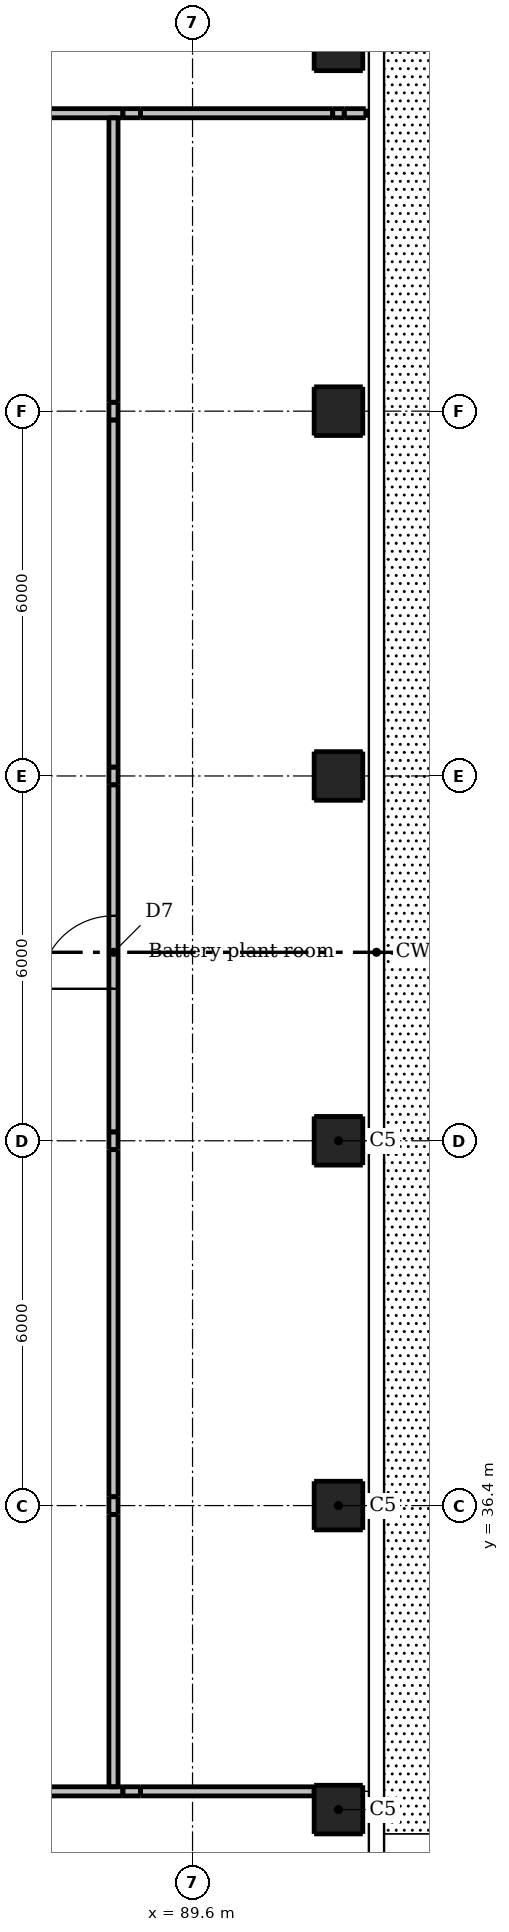
"""IFC4 building model, lengths in metres.
Left out: names, types, materials, properties, quantities, classifications, styles, units other than length and angle.
Written with IfcOpenShell. Run it as: python <this file> out.ifc"""

import sys

from ifc_helpers import new_model, si_unit, direction, frame, frame_2d, origin, origin_2d, place, context, subcontext, project, spatial, rectangle, extrude, element, fill, save


model = new_model("IFC4")
c1 = context("Model", 3, precision=1e-05, world=origin(), true_north=direction((0.0, 1.0)))
c2 = subcontext(c1, "Body", "Model", "MODEL_VIEW")
j1 = project(units=[si_unit("LENGTHUNIT", "METRE"), si_unit("PLANEANGLEUNIT", "RADIAN")], contexts=[c1])
p1 = place(None, origin())
s1 = spatial("IfcSite", under=j1, at=p1, CompositionType="ELEMENT")
p2 = place(p1, origin())
s2 = spatial("IfcBuilding", under=s1, at=p2, CompositionType="ELEMENT")
p3 = place(p2, frame((0.0, 0.0, 290.8)))
s3 = spatial("IfcBuildingStorey", under=s2, at=p3, CompositionType="ELEMENT", Elevation=290.8)
for number, where, z_axis, x_axis in (
    (1, (92.0, 31.4, 0.0), (0.0, 0.0, 1.0), (1.0, 0.0, 0.0)),
    (2, (92.0, 36.4, 0.0), (0.0, 0.0, 1.0), (1.0, 0.0, 0.0)),
    (3, (92.0, 42.4, 0.0), (0.0, 0.0, 1.0), (1.0, 0.0, 0.0)),
    (4, (92.0, 48.4, 0.0), (0.0, 0.0, 1.0), (1.0, 0.0, 0.0)),
    (5, (92.0, 54.4, 0.0), (0.0, 0.0, 1.0), (1.0, 0.0, 0.0)),
    (6, (92.0, 60.4, 0.0), (0.0, 0.0, 1.0), (1.0, 0.0, 0.0)),
):
    element("IfcColumn", number, at=place(p3, frame(where, z_axis=z_axis, x_axis=x_axis)), inside=s3, PredefinedType="COLUMN", context=c2, shape_type="SweptSolid", body=[
        extrude(rectangle(XDim=0.8, YDim=0.8, at=origin_2d()), origin(), (0.0, 0.0, 1.0), 3.3),
    ])
p4 = place(p3, frame((83.746, 31.7, 0.0), z_axis=(0.0, 0.0, 1.0), x_axis=(1.0, 0.0, 0.0)))
e7 = element("IfcWall", 7, at=p4, inside=s3, PredefinedType="PARTITIONING", context=c2, shape_type="SweptSolid", body=[
    extrude(rectangle(XDim=4.708, YDim=0.15, at=frame_2d((2.354, 0.0))), origin(), (0.0, 0.0, 1.0), 3.3),
])
p5 = place(p3, frame((88.454, 31.7, 0.0), z_axis=(0.0, 0.0, 1.0), x_axis=(1.0, 0.0, 0.0)))
e8 = element("IfcWall", 8, at=p5, inside=s3, PredefinedType="PARTITIONING", context=c2, shape_type="SweptSolid", body=[
    extrude(rectangle(XDim=0.292, YDim=0.15, at=frame_2d((0.146, 0.0))), origin(), (0.0, 0.0, 1.0), 2.462),
])
p6 = place(p3, frame((88.746, 31.7, 0.0), z_axis=(0.0, 0.0, 1.0), x_axis=(1.0, 0.0, 0.0)))
e9 = element("IfcWall", 9, at=p6, inside=s3, PredefinedType="PARTITIONING", context=c2, shape_type="SweptSolid", body=[
    extrude(rectangle(XDim=2.854, YDim=0.15, at=frame_2d((1.427, 0.0))), origin(), (0.0, 0.0, 1.0), 3.3),
])
p7 = place(p3, frame((83.746, 59.3, 0.0), z_axis=(0.0, 0.0, 1.0), x_axis=(1.0, 0.0, 0.0)))
e10 = element("IfcWall", 10, at=p7, inside=s3, PredefinedType="PARTITIONING", context=c2, shape_type="SweptSolid", body=[
    extrude(rectangle(XDim=4.708, YDim=0.15, at=frame_2d((2.354, 0.0))), origin(), (0.0, 0.0, 1.0), 3.3),
])
p8 = place(p3, frame((88.454, 59.3, 0.0), z_axis=(0.0, 0.0, 1.0), x_axis=(1.0, 0.0, 0.0)))
e11 = element("IfcWall", 11, at=p8, inside=s3, PredefinedType="PARTITIONING", context=c2, shape_type="SweptSolid", body=[
    extrude(rectangle(XDim=0.292, YDim=0.15, at=frame_2d((0.146, 0.0))), origin(), (0.0, 0.0, 1.0), 2.462),
])
p9 = place(p3, frame((88.746, 59.3, 0.0), z_axis=(0.0, 0.0, 1.0), x_axis=(1.0, 0.0, 0.0)))
e12 = element("IfcWall", 12, at=p9, inside=s3, PredefinedType="PARTITIONING", context=c2, shape_type="SweptSolid", body=[
    extrude(rectangle(XDim=3.159, YDim=0.15, at=frame_2d((1.58, 0.0))), origin(), (0.0, 0.0, 1.0), 3.3),
])
p10 = place(p3, frame((91.905, 59.3, 0.0), z_axis=(0.0, 0.0, 1.0), x_axis=(1.0, 0.0, 0.0)))
e13 = element("IfcWall", 13, at=p10, inside=s3, PredefinedType="PARTITIONING", context=c2, shape_type="SweptSolid", body=[
    extrude(rectangle(XDim=0.19, YDim=0.15, at=frame_2d((0.095, 0.0))), origin(), (0.0, 0.0, 1.0), 2.847),
])
p11 = place(p3, frame((92.095, 59.3, 0.0), z_axis=(0.0, 0.0, 1.0), x_axis=(1.0, 0.0, 0.0)))
e14 = element("IfcWall", 14, at=p11, inside=s3, PredefinedType="PARTITIONING", context=c2, shape_type="SweptSolid", body=[
    extrude(rectangle(XDim=0.355, YDim=0.15, at=frame_2d((0.177, 0.0))), origin(), (0.0, 0.0, 1.0), 3.3),
])
p12 = place(p3, frame((88.3, 31.775, 0.0), z_axis=(0.0, 0.0, 1.0), x_axis=(0.0, 1.0, 0.0)))
e15 = element("IfcWall", 15, at=p12, inside=s3, PredefinedType="PARTITIONING", context=c2, shape_type="SweptSolid", body=[
    extrude(rectangle(XDim=4.479, YDim=0.15, at=frame_2d((2.24, 0.0))), origin(), (0.0, 0.0, 1.0), 3.3),
])
p13 = place(p3, frame((88.3, 36.254, 0.0), z_axis=(0.0, 0.0, 1.0), x_axis=(0.0, 1.0, 0.0)))
e16 = element("IfcWall", 16, at=p13, inside=s3, PredefinedType="PARTITIONING", context=c2, shape_type="SweptSolid", body=[
    extrude(rectangle(XDim=0.292, YDim=0.15, at=frame_2d((0.146, 0.0))), origin(), (0.0, 0.0, 1.0), 2.459),
])
p14 = place(p3, frame((88.3, 36.546, 0.0), z_axis=(0.0, 0.0, 1.0), x_axis=(0.0, 1.0, 0.0)))
e17 = element("IfcWall", 17, at=p14, inside=s3, PredefinedType="PARTITIONING", context=c2, shape_type="SweptSolid", body=[
    extrude(rectangle(XDim=5.708, YDim=0.15, at=frame_2d((2.854, 0.0))), origin(), (0.0, 0.0, 1.0), 3.3),
])
p15 = place(p3, frame((88.3, 42.254, 0.0), z_axis=(0.0, 0.0, 1.0), x_axis=(0.0, 1.0, 0.0)))
e18 = element("IfcWall", 18, at=p15, inside=s3, PredefinedType="PARTITIONING", context=c2, shape_type="SweptSolid", body=[
    extrude(rectangle(XDim=0.292, YDim=0.15, at=frame_2d((0.146, 0.0))), origin(), (0.0, 0.0, 1.0), 2.465),
])
p16 = place(p3, frame((88.3, 42.546, 0.0), z_axis=(0.0, 0.0, 1.0), x_axis=(0.0, 1.0, 0.0)))
e19 = element("IfcWall", 19, at=p16, inside=s3, PredefinedType="PARTITIONING", context=c2, shape_type="SweptSolid", body=[
    extrude(rectangle(XDim=5.708, YDim=0.15, at=frame_2d((2.854, 0.0))), origin(), (0.0, 0.0, 1.0), 3.3),
])
p17 = place(p16, frame((2.354, 0.0, 0.0)))
e20 = element("IfcOpeningElement", 20, at=p17, cuts=e19, PredefinedType="OPENING", context=c2, shape_type="SweptSolid", body=[
    extrude(rectangle(XDim=1.2, YDim=2.1, at=frame_2d((0.6, 1.05))), frame((0.0, 0.085, 0.0), z_axis=(0.0, -1.0, 0.0), x_axis=(1.0, 0.0, 0.0)), (0.0, 0.0, 1.0), 0.17),
])
p18 = place(p3, frame((88.3, 48.254, 0.0), z_axis=(0.0, 0.0, 1.0), x_axis=(0.0, 1.0, 0.0)))
e21 = element("IfcWall", 21, at=p18, inside=s3, PredefinedType="PARTITIONING", context=c2, shape_type="SweptSolid", body=[
    extrude(rectangle(XDim=0.292, YDim=0.15, at=frame_2d((0.146, 0.0))), origin(), (0.0, 0.0, 1.0), 2.465),
])
p19 = place(p3, frame((88.3, 48.546, 0.0), z_axis=(0.0, 0.0, 1.0), x_axis=(0.0, 1.0, 0.0)))
e22 = element("IfcWall", 22, at=p19, inside=s3, PredefinedType="PARTITIONING", context=c2, shape_type="SweptSolid", body=[
    extrude(rectangle(XDim=5.708, YDim=0.15, at=frame_2d((2.854, 0.0))), origin(), (0.0, 0.0, 1.0), 3.3),
])
p20 = place(p3, frame((88.3, 54.254, 0.0), z_axis=(0.0, 0.0, 1.0), x_axis=(0.0, 1.0, 0.0)))
e23 = element("IfcWall", 23, at=p20, inside=s3, PredefinedType="PARTITIONING", context=c2, shape_type="SweptSolid", body=[
    extrude(rectangle(XDim=0.292, YDim=0.15, at=frame_2d((0.146, 0.0))), origin(), (0.0, 0.0, 1.0), 2.459),
])
p21 = place(p3, frame((88.3, 54.546, 0.0), z_axis=(0.0, 0.0, 1.0), x_axis=(0.0, 1.0, 0.0)))
e24 = element("IfcWall", 24, at=p21, inside=s3, PredefinedType="PARTITIONING", context=c2, shape_type="SweptSolid", body=[
    extrude(rectangle(XDim=4.679, YDim=0.15, at=frame_2d((2.34, 0.0))), origin(), (0.0, 0.0, 1.0), 3.3),
])
p22 = place(p17, origin())
e25 = element("IfcDoor", 25, at=p22, inside=s3, OperationType="SINGLE_SWING_LEFT", PredefinedType="DOOR", context=c2, shape_type="SweptSolid", body=[
    extrude(rectangle(XDim=1.2, YDim=2.1, at=frame_2d((0.6, 1.05))), frame((0.0, 0.025, 0.0), z_axis=(0.0, -1.0, 0.0), x_axis=(1.0, 0.0, 0.0)), (0.0, 0.0, 1.0), 0.05),
])
fill(e20, e25)
save(model, sys.argv[1])
